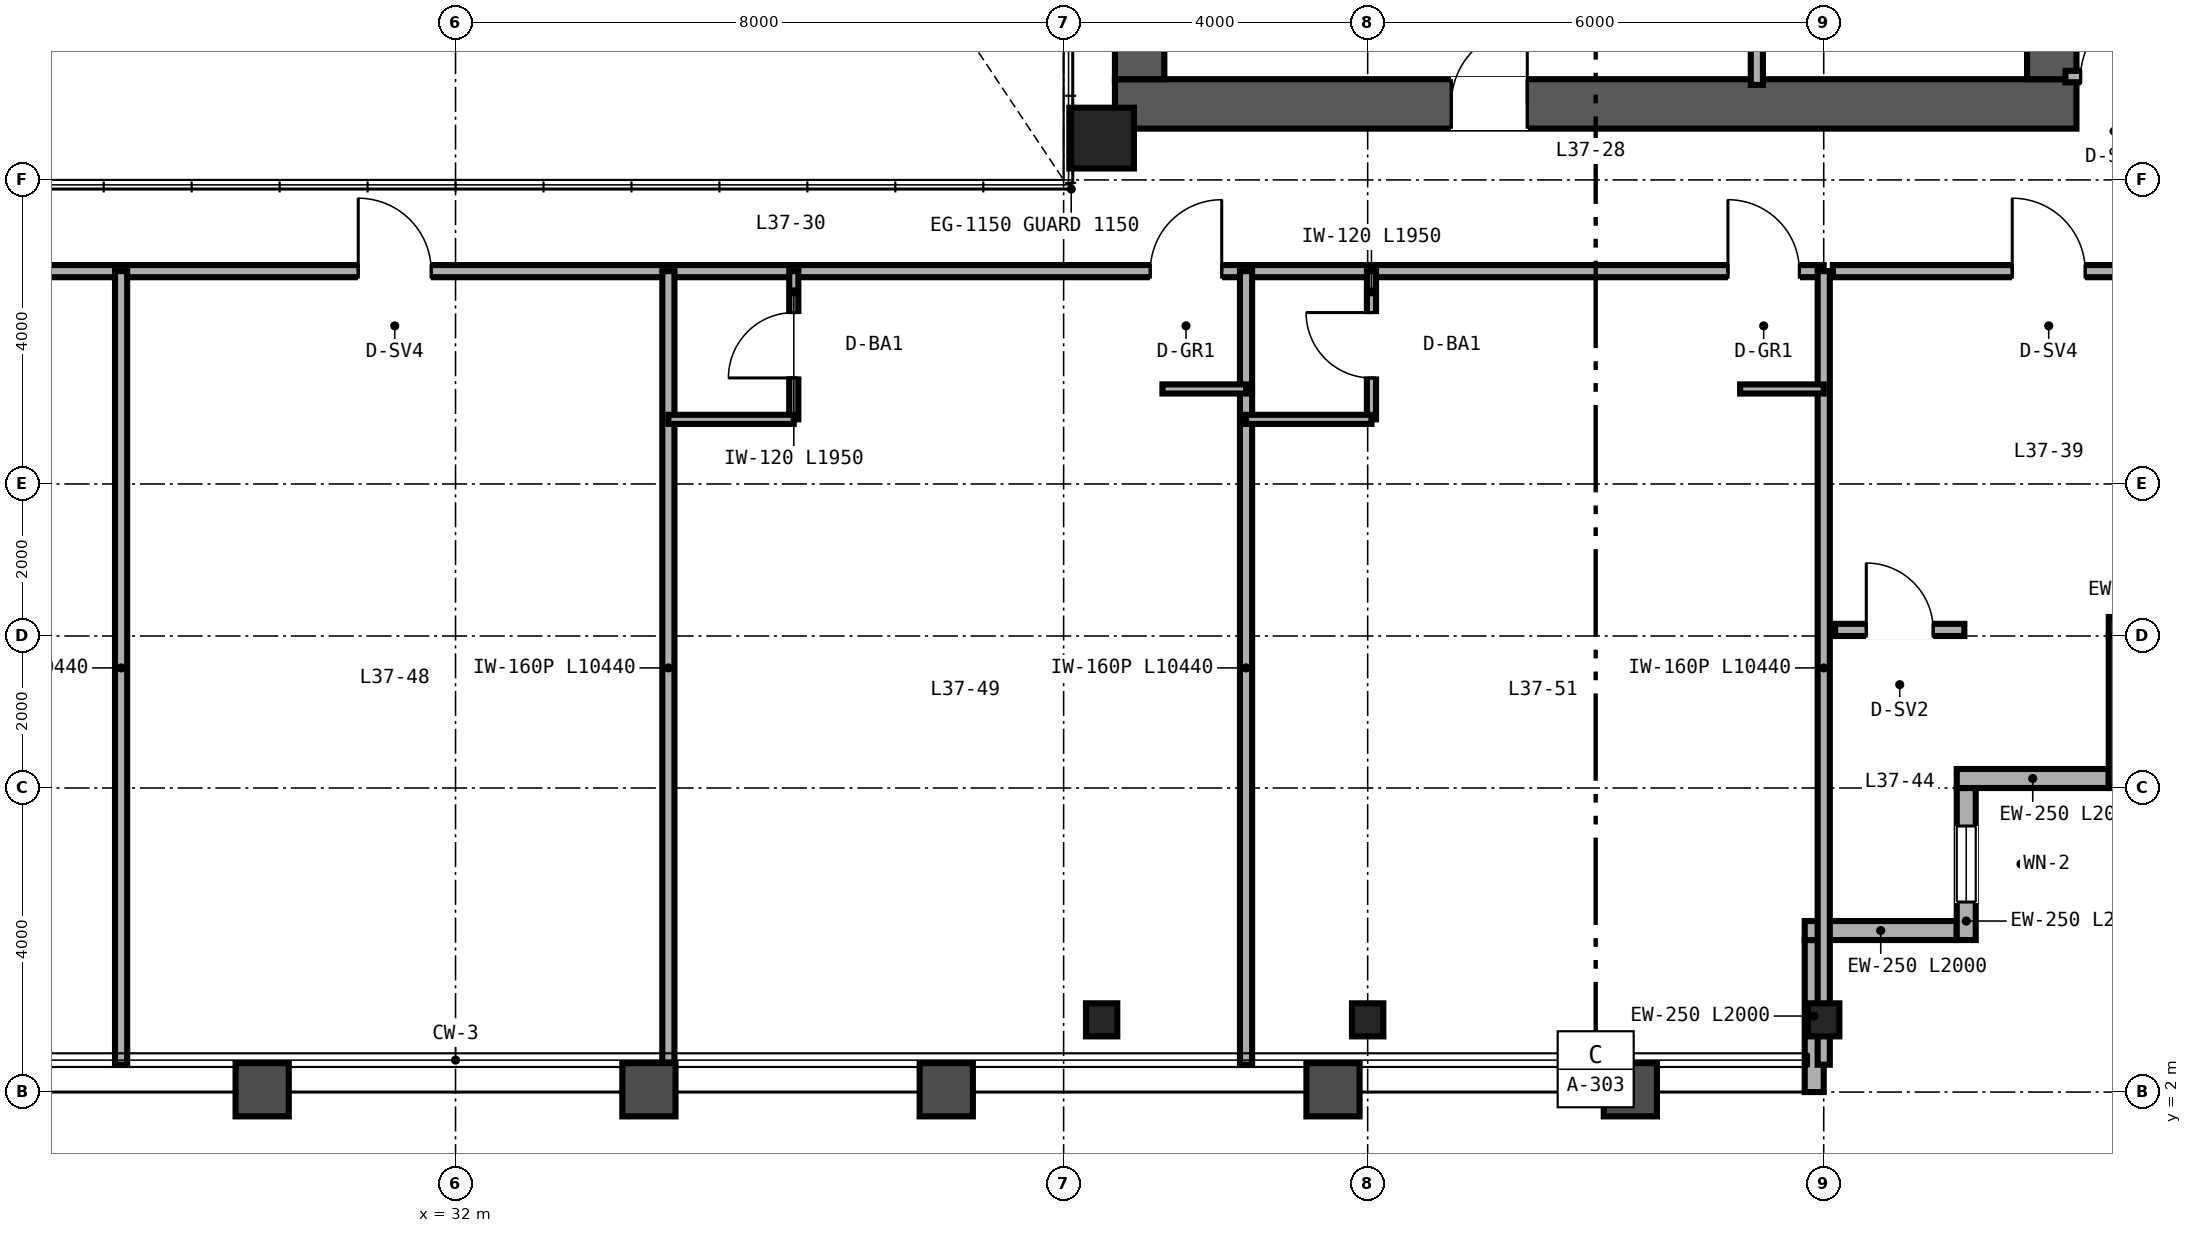
"""IFC4 building model, lengths in metres.
Left out: names, types, materials, properties, quantities, classifications, styles, units other than length and angle.
Written with IfcOpenShell. Run it as: python <this file> out.ifc"""

import sys

from ifc_helpers import new_model, si_unit, direction, frame, frame_2d, origin, origin_2d, place, context, subcontext, project, spatial, rectangle, hollow_rectangle, i_section, extrude, source, transform, mapped, element, fill, save


model = new_model("IFC4")
c1 = context("Model", 3, precision=1e-05, world=origin(), true_north=direction((0.0, 1.0)))
c2 = subcontext(c1, "Body", "Model", "MODEL_VIEW")
j1 = project(units=[si_unit("LENGTHUNIT", "METRE"), si_unit("PLANEANGLEUNIT", "RADIAN")], contexts=[c1])
p1 = place(None, origin())
s1 = spatial("IfcSite", under=j1, at=p1, CompositionType="ELEMENT")
p2 = place(p1, origin())
s2 = spatial("IfcBuilding", under=s1, at=p2, CompositionType="ELEMENT")
p3 = place(p2, frame((0.0, 0.0, 147.6)))
s3 = spatial("IfcBuildingStorey", under=s2, at=p3, CompositionType="ELEMENT", Elevation=147.6)
p4 = place(p3, frame((40.675, 15.0, 0.0), z_axis=(0.0, 0.0, 1.0), x_axis=(1.0, 0.0, 0.0)))
e1 = element("IfcWall", 1, at=p4, inside=s3, PredefinedType="SHEAR", context=c2, shape_type="SweptSolid", body=[
    extrude(rectangle(XDim=12.65, YDim=0.65, at=frame_2d((6.325, 0.0))), origin(), (0.0, 0.0, 1.0), 3.28),
])
p5 = place(p4, frame((4.425, 0.0, 0.0)))
e2 = element("IfcOpeningElement", 2, at=p5, cuts=e1, PredefinedType="OPENING", context=c2, shape_type="SweptSolid", body=[
    extrude(rectangle(XDim=1.0, YDim=2.15, at=frame_2d((0.5, 1.075))), frame((0.0, 0.335, 0.0), z_axis=(0.0, -1.0, 0.0), x_axis=(1.0, 0.0, 0.0)), (0.0, 0.0, 1.0), 0.67),
])
for number, where, z_axis, x_axis in (
    (3, (41.0, 15.325, 0.0), (0.0, 0.0, 1.0), (0.0, 1.0, 0.0)),
    (4, (53.0, 15.325, 0.0), (0.0, 0.0, 1.0), (0.0, 1.0, 0.0)),
):
    element("IfcWall", number, at=place(p3, frame(where, z_axis=z_axis, x_axis=x_axis)), inside=s3, PredefinedType="SHEAR", context=c2, shape_type="SweptSolid", body=[
        extrude(rectangle(XDim=21.35, YDim=0.65, at=frame_2d((10.675, 0.0))), origin(), (0.0, 0.0, 1.0), 3.28),
    ])
m1 = source(origin(), c2, "Body", "SweptSolid", [
    extrude(hollow_rectangle(XDim=0.85, YDim=0.8, WallThickness=0.032, at=origin_2d()), origin(), (0.0, 0.0, 1.0), 3.28),
])
p6 = place(p3, frame((40.5, 14.55, 0.0), z_axis=(0.0, 0.0, 1.0), x_axis=(1.0, 0.0, 0.0)))
e5 = element("IfcColumn", 5, at=p6, inside=s3, PredefinedType="COLUMN", context=c2, shape_type="MappedRepresentation", body=[
    mapped(m1, transform((0.0, 0.0, 0.0), scale=1.0)),
])
m2 = source(origin(), c2, "Body", "SweptSolid", [
    extrude(i_section(OverallWidth=0.412, OverallDepth=0.435, WebThickness=0.036, FlangeThickness=0.057, FilletRadius=0.025, at=origin_2d()), origin(), (0.0, 0.0, 1.0), 3.28),
])
for number, where, z_axis, x_axis in (
    (6, (40.5, 2.95, 0.0), (0.0, 0.0, 1.0), (1.0, 0.0, 0.0)),
    (7, (44.0, 2.95, 0.0), (0.0, 0.0, 1.0), (1.0, 0.0, 0.0)),
    (8, (50.0, 2.95, 0.0), (0.0, 0.0, 1.0), (1.0, 0.0, 0.0)),
):
    element("IfcColumn", number, at=place(p3, frame(where, z_axis=z_axis, x_axis=x_axis)), inside=s3, PredefinedType="COLUMN", context=c2, shape_type="MappedRepresentation", body=[
        mapped(m2, transform((0.0, 0.0, 0.0), scale=1.0)),
    ])
p7 = place(p3, frame((49.875, 2.0, 0.0), z_axis=(0.0, 0.0, 1.0), x_axis=(0.0, 1.0, 0.0)))
e9 = element("IfcWall", 9, at=p7, inside=s3, PredefinedType="SOLIDWALL", context=c2, shape_type="SweptSolid", body=[
    extrude(rectangle(XDim=2.0, YDim=0.25, at=frame_2d((1.0, 0.0))), origin(), (0.0, 0.0, 1.0), 2.587),
])
p8 = place(p3, frame((49.75, 4.125, 0.0), z_axis=(0.0, 0.0, 1.0), x_axis=(1.0, 0.0, 0.0)))
e10 = element("IfcWall", 10, at=p8, inside=s3, PredefinedType="SOLIDWALL", context=c2, shape_type="SweptSolid", body=[
    extrude(rectangle(XDim=2.0, YDim=0.25, at=frame_2d((1.0, 0.0))), origin(), (0.0, 0.0, 1.0), 3.28),
])
p9 = place(p3, frame((51.875, 4.0, 0.0), z_axis=(0.0, 0.0, 1.0), x_axis=(0.0, 1.0, 0.0)))
e11 = element("IfcWall", 11, at=p9, inside=s3, PredefinedType="SOLIDWALL", context=c2, shape_type="SweptSolid", body=[
    extrude(rectangle(XDim=2.0, YDim=0.25, at=frame_2d((1.0, 0.0))), origin(), (0.0, 0.0, 1.0), 3.28),
])
p10 = place(p9, frame((0.5, 0.0, 0.85)))
e12 = element("IfcOpeningElement", 12, at=p10, cuts=e11, PredefinedType="OPENING", context=c2, shape_type="SweptSolid", body=[
    extrude(rectangle(XDim=1.0, YDim=1.9, at=frame_2d((0.5, 0.95))), frame((0.0, 0.135, 0.0), z_axis=(0.0, -1.0, 0.0), x_axis=(1.0, 0.0, 0.0)), (0.0, 0.0, 1.0), 0.27),
])
for number, where, z_axis, x_axis in (
    (13, (51.75, 6.125, 0.0), (0.0, 0.0, 1.0), (1.0, 0.0, 0.0)),
    (14, (53.875, 6.0, 0.0), (0.0, 0.0, 1.0), (0.0, 1.0, 0.0)),
):
    element("IfcWall", number, at=place(p3, frame(where, z_axis=z_axis, x_axis=x_axis)), inside=s3, PredefinedType="SOLIDWALL", context=c2, shape_type="SweptSolid", body=[
        extrude(rectangle(XDim=2.0, YDim=0.25, at=frame_2d((1.0, 0.0))), origin(), (0.0, 0.0, 1.0), 3.28),
    ])
p11 = place(p3, frame((53.75, 8.125, 0.0), z_axis=(0.0, 0.0, 1.0), x_axis=(1.0, 0.0, 0.0)))
e15 = element("IfcWall", 15, at=p11, inside=s3, PredefinedType="SOLIDWALL", context=c2, shape_type="SweptSolid", body=[
    extrude(rectangle(XDim=2.25, YDim=0.25, at=frame_2d((1.125, 0.0))), origin(), (0.0, 0.0, 1.0), 3.28),
])
p12 = place(p3, frame((49.12, 15.25, 0.0), z_axis=(0.0, 0.0, 1.0), x_axis=(0.0, 1.0, 0.0)))
e16 = element("IfcWall", 16, at=p12, inside=s3, PredefinedType="PARTITIONING", context=c2, shape_type="SweptSolid", body=[
    extrude(rectangle(XDim=16.13, YDim=0.16, at=frame_2d((8.065, 0.0))), origin(), (0.0, 0.0, 1.0), 2.36),
])
p13 = place(p12, frame((3.8, 0.0, 0.0)))
e17 = element("IfcOpeningElement", 17, at=p13, cuts=e16, PredefinedType="OPENING", context=c2, shape_type="SweptSolid", body=[
    extrude(rectangle(XDim=0.92, YDim=2.15, at=frame_2d((0.46, 1.075))), frame((0.0, 0.09, 0.0), z_axis=(0.0, -1.0, 0.0), x_axis=(1.0, 0.0, 0.0)), (0.0, 0.0, 1.0), 0.18),
])
p14 = place(p12, frame((11.8, 0.0, 0.0)))
e18 = element("IfcOpeningElement", 18, at=p14, cuts=e16, PredefinedType="OPENING", context=c2, shape_type="SweptSolid", body=[
    extrude(rectangle(XDim=0.9, YDim=2.15, at=frame_2d((0.45, 1.075))), frame((0.0, 0.09, 0.0), z_axis=(0.0, -1.0, 0.0), x_axis=(1.0, 0.0, 0.0)), (0.0, 0.0, 1.0), 0.18),
])
p15 = place(p3, frame((53.18, 15.36, 0.0), z_axis=(0.0, 0.0, 1.0), x_axis=(1.0, 0.0, 0.0)))
e19 = element("IfcWall", 19, at=p15, inside=s3, PredefinedType="PARTITIONING", context=c2, shape_type="SweptSolid", body=[
    extrude(rectangle(XDim=2.66, YDim=0.15, at=frame_2d((1.33, 0.0))), origin(), (0.0, 0.0, 1.0), 2.501),
])
p16 = place(p15, frame((0.2, 0.0, 0.0)))
e20 = element("IfcOpeningElement", 20, at=p16, cuts=e19, PredefinedType="OPENING", context=c2, shape_type="SweptSolid", body=[
    extrude(rectangle(XDim=0.88, YDim=2.15, at=frame_2d((0.44, 1.075))), frame((0.0, 0.085, 0.0), z_axis=(0.0, -1.0, 0.0), x_axis=(1.0, 0.0, 0.0)), (0.0, 0.0, 1.0), 0.17),
])
p17 = place(p3, frame((50.12, 12.8, 0.0), z_axis=(0.0, 0.0, 1.0), x_axis=(1.0, 0.0, 0.0)))
e21 = element("IfcWall", 21, at=p17, inside=s3, PredefinedType="PARTITIONING", context=c2, shape_type="SweptSolid", body=[
    extrude(rectangle(XDim=5.68, YDim=0.16, at=frame_2d((2.84, 0.0))), origin(), (0.0, 0.0, 1.0), 3.28),
])
p18 = place(p17, frame((2.36, 0.0, 0.0)))
e22 = element("IfcOpeningElement", 22, at=p18, cuts=e21, PredefinedType="OPENING", context=c2, shape_type="SweptSolid", body=[
    extrude(rectangle(XDim=0.96, YDim=2.15, at=frame_2d((0.48, 1.075))), frame((0.0, 0.09, 0.0), z_axis=(0.0, -1.0, 0.0), x_axis=(1.0, 0.0, 0.0)), (0.0, 0.0, 1.0), 0.18),
])
p19 = place(p3, frame((50.15, 8.08, 0.0), z_axis=(0.0, 0.0, 1.0), x_axis=(1.0, 0.0, 0.0)))
e23 = element("IfcWall", 23, at=p19, inside=s3, PredefinedType="PARTITIONING", context=c2, shape_type="SweptSolid", body=[
    extrude(rectangle(XDim=1.7, YDim=0.16, at=frame_2d((0.85, 0.0))), origin(), (0.0, 0.0, 1.0), 3.28),
])
p20 = place(p19, frame((0.41, 0.0, 0.0)))
e24 = element("IfcOpeningElement", 24, at=p20, cuts=e23, PredefinedType="OPENING", context=c2, shape_type="SweptSolid", body=[
    extrude(rectangle(XDim=0.88, YDim=2.15, at=frame_2d((0.44, 1.075))), frame((0.0, 0.09, 0.0), z_axis=(0.0, -1.0, 0.0), x_axis=(1.0, 0.0, 0.0)), (0.0, 0.0, 1.0), 0.18),
])
p21 = place(p3, frame((14.0, 12.8, 0.0), z_axis=(0.0, 0.0, 1.0), x_axis=(1.0, 0.0, 0.0)))
e25 = element("IfcWall", 25, at=p21, inside=s3, PredefinedType="PARTITIONING", context=c2, shape_type="SweptSolid", body=[
    extrude(rectangle(XDim=36.0, YDim=0.16, at=frame_2d((18.0, 0.0))), origin(), (0.0, 0.0, 1.0), 2.501),
])
p22 = place(p21, frame((5.5, 0.0, 0.0)))
e26 = element("IfcOpeningElement", 26, at=p22, cuts=e25, PredefinedType="OPENING", context=c2, shape_type="SweptSolid", body=[
    extrude(rectangle(XDim=0.98, YDim=2.2, at=frame_2d((0.49, 1.1))), frame((0.0, 0.09, 0.0), z_axis=(0.0, -1.0, 0.0), x_axis=(1.0, 0.0, 0.0)), (0.0, 0.0, 1.0), 0.18),
])
p23 = place(p21, frame((10.2, 0.0, 0.0)))
e27 = element("IfcOpeningElement", 27, at=p23, cuts=e25, PredefinedType="OPENING", context=c2, shape_type="SweptSolid", body=[
    extrude(rectangle(XDim=0.96, YDim=2.15, at=frame_2d((0.48, 1.075))), frame((0.0, 0.09, 0.0), z_axis=(0.0, -1.0, 0.0), x_axis=(1.0, 0.0, 0.0)), (0.0, 0.0, 1.0), 0.18),
])
p24 = place(p21, frame((16.72, 0.0, 0.0)))
e28 = element("IfcOpeningElement", 28, at=p24, cuts=e25, PredefinedType="OPENING", context=c2, shape_type="SweptSolid", body=[
    extrude(rectangle(XDim=0.96, YDim=2.15, at=frame_2d((0.48, 1.075))), frame((0.0, 0.09, 0.0), z_axis=(0.0, -1.0, 0.0), x_axis=(1.0, 0.0, 0.0)), (0.0, 0.0, 1.0), 0.18),
])
p25 = place(p21, frame((27.14, 0.0, 0.0)))
e29 = element("IfcOpeningElement", 29, at=p25, cuts=e25, PredefinedType="OPENING", context=c2, shape_type="SweptSolid", body=[
    extrude(rectangle(XDim=0.94, YDim=2.15, at=frame_2d((0.47, 1.075))), frame((0.0, 0.09, 0.0), z_axis=(0.0, -1.0, 0.0), x_axis=(1.0, 0.0, 0.0)), (0.0, 0.0, 1.0), 0.18),
])
p26 = place(p21, frame((34.74, 0.0, 0.0)))
e30 = element("IfcOpeningElement", 30, at=p26, cuts=e25, PredefinedType="OPENING", context=c2, shape_type="SweptSolid", body=[
    extrude(rectangle(XDim=0.94, YDim=2.15, at=frame_2d((0.47, 1.075))), frame((0.0, 0.09, 0.0), z_axis=(0.0, -1.0, 0.0), x_axis=(1.0, 0.0, 0.0)), (0.0, 0.0, 1.0), 0.18),
])
p27 = place(p3, frame((50.0, 2.36, 0.0), z_axis=(0.0, 0.0, 1.0), x_axis=(0.0, 1.0, 0.0)))
e31 = element("IfcWall", 31, at=p27, inside=s3, PredefinedType="PARTITIONING", context=c2, shape_type="SweptSolid", body=[
    extrude(rectangle(XDim=10.44, YDim=0.16, at=frame_2d((5.22, 0.0))), origin(), (0.0, 0.0, 1.0), 2.587),
])
for number, where, z_axis, x_axis in (
    (32, (27.6, 2.36, 0.0), (0.0, 0.0, 1.0), (0.0, 1.0, 0.0)),
    (33, (34.8, 2.36, 0.0), (0.0, 0.0, 1.0), (0.0, 1.0, 0.0)),
):
    element("IfcWall", number, at=place(p3, frame(where, z_axis=z_axis, x_axis=x_axis)), inside=s3, PredefinedType="PARTITIONING", context=c2, shape_type="SweptSolid", body=[
        extrude(rectangle(XDim=10.44, YDim=0.16, at=frame_2d((5.22, 0.0))), origin(), (0.0, 0.0, 1.0), 2.36),
    ])
p28 = place(p3, frame((42.4, 2.36, 0.0), z_axis=(0.0, 0.0, 1.0), x_axis=(0.0, 1.0, 0.0)))
e34 = element("IfcWall", 34, at=p28, inside=s3, PredefinedType="PARTITIONING", context=c2, shape_type="SweptSolid", body=[
    extrude(rectangle(XDim=10.44, YDim=0.16, at=frame_2d((5.22, 0.0))), origin(), (0.0, 0.0, 1.0), 2.743),
])
p29 = place(p3, frame((36.45, 10.85, 0.0), z_axis=(0.0, 0.0, 1.0), x_axis=(0.0, 1.0, 0.0)))
e35 = element("IfcWall", 35, at=p29, inside=s3, PredefinedType="PARTITIONING", context=c2, shape_type="SweptSolid", body=[
    extrude(rectangle(XDim=1.95, YDim=0.12, at=frame_2d((0.975, 0.0))), origin(), (0.0, 0.0, 1.0), 3.28),
])
p30 = place(p29, frame((0.545, 0.0, 0.0)))
e36 = element("IfcOpeningElement", 36, at=p30, cuts=e35, PredefinedType="OPENING", context=c2, shape_type="SweptSolid", body=[
    extrude(rectangle(XDim=0.86, YDim=2.1, at=frame_2d((0.43, 1.05))), frame((0.0, 0.07, 0.0), z_axis=(0.0, -1.0, 0.0), x_axis=(1.0, 0.0, 0.0)), (0.0, 0.0, 1.0), 0.14),
])
p31 = place(p3, frame((34.8, 10.85, 0.0), z_axis=(0.0, 0.0, 1.0), x_axis=(1.0, 0.0, 0.0)))
e37 = element("IfcWall", 37, at=p31, inside=s3, PredefinedType="PARTITIONING", context=c2, shape_type="SweptSolid", body=[
    extrude(rectangle(XDim=1.65, YDim=0.12, at=frame_2d((0.825, 0.0))), origin(), (0.0, 0.0, 1.0), 3.28),
])
p32 = place(p3, frame((41.3, 11.25, 0.0), z_axis=(0.0, 0.0, 1.0), x_axis=(1.0, 0.0, 0.0)))
e38 = element("IfcWall", 38, at=p32, inside=s3, PredefinedType="PARTITIONING", context=c2, shape_type="SweptSolid", body=[
    extrude(rectangle(XDim=1.1, YDim=0.12, at=frame_2d((0.55, 0.0))), origin(), (0.0, 0.0, 1.0), 3.28),
])
p33 = place(p3, frame((44.05, 10.85, 0.0), z_axis=(0.0, 0.0, 1.0), x_axis=(0.0, 1.0, 0.0)))
e39 = element("IfcWall", 39, at=p33, inside=s3, PredefinedType="PARTITIONING", context=c2, shape_type="SweptSolid", body=[
    extrude(rectangle(XDim=1.95, YDim=0.12, at=frame_2d((0.975, 0.0))), origin(), (0.0, 0.0, 1.0), 3.28),
])
p34 = place(p33, frame((0.545, 0.0, 0.0)))
e40 = element("IfcOpeningElement", 40, at=p34, cuts=e39, PredefinedType="OPENING", context=c2, shape_type="SweptSolid", body=[
    extrude(rectangle(XDim=0.86, YDim=2.1, at=frame_2d((0.43, 1.05))), frame((0.0, 0.07, 0.0), z_axis=(0.0, -1.0, 0.0), x_axis=(1.0, 0.0, 0.0)), (0.0, 0.0, 1.0), 0.14),
])
p35 = place(p3, frame((42.4, 10.85, 0.0), z_axis=(0.0, 0.0, 1.0), x_axis=(1.0, 0.0, 0.0)))
e41 = element("IfcWall", 41, at=p35, inside=s3, PredefinedType="PARTITIONING", context=c2, shape_type="SweptSolid", body=[
    extrude(rectangle(XDim=1.65, YDim=0.12, at=frame_2d((0.825, 0.0))), origin(), (0.0, 0.0, 1.0), 3.28),
])
p36 = place(p3, frame((48.9, 11.25, 0.0), z_axis=(0.0, 0.0, 1.0), x_axis=(1.0, 0.0, 0.0)))
e42 = element("IfcWall", 42, at=p36, inside=s3, PredefinedType="PARTITIONING", context=c2, shape_type="SweptSolid", body=[
    extrude(rectangle(XDim=1.1, YDim=0.12, at=frame_2d((0.55, 0.0))), origin(), (0.0, 0.0, 1.0), 3.28),
])
m3 = source(origin(), c2, "Body", "SweptSolid", [
    extrude(rectangle(XDim=1.0, YDim=1.9, at=frame_2d((0.5, 0.95))), frame((0.0, 0.03, 0.0), z_axis=(0.0, -1.0, 0.0), x_axis=(1.0, 0.0, 0.0)), (0.0, 0.0, 1.0), 0.06),
])
p37 = place(p10, origin())
e43 = element("IfcWindow", 43, at=p37, inside=s3, PartitioningType="SINGLE_PANEL", PredefinedType="WINDOW", context=c2, shape_type="MappedRepresentation", body=[
    mapped(m3, transform((0.0, 0.0, 0.0), scale=1.0)),
])
fill(e12, e43)
m4 = source(origin(), c2, "Body", "SweptSolid", [
    extrude(rectangle(XDim=1.0, YDim=2.15, at=frame_2d((0.5, 1.075))), frame((0.0, 0.025, 0.0), z_axis=(0.0, -1.0, 0.0), x_axis=(1.0, 0.0, 0.0)), (0.0, 0.0, 1.0), 0.05),
])
p38 = place(p5, origin())
e44 = element("IfcDoor", 44, at=p38, inside=s3, OperationType="SINGLE_SWING_RIGHT", PredefinedType="DOOR", context=c2, shape_type="MappedRepresentation", body=[
    mapped(m4, transform((0.0, 0.0, 0.0), scale=1.0)),
])
fill(e2, e44)
m5 = source(origin(), c2, "Body", "SweptSolid", [
    extrude(rectangle(XDim=0.88, YDim=2.15, at=frame_2d((0.44, 1.075))), frame((0.0, 0.025, 0.0), z_axis=(0.0, -1.0, 0.0), x_axis=(1.0, 0.0, 0.0)), (0.0, 0.0, 1.0), 0.05),
])
p39 = place(p16, origin())
e45 = element("IfcDoor", 45, at=p39, inside=s3, OperationType="SINGLE_SWING_RIGHT", PredefinedType="DOOR", context=c2, shape_type="MappedRepresentation", body=[
    mapped(m5, transform((0.0, 0.0, 0.0), scale=1.0)),
])
fill(e20, e45)
m6 = source(origin(), c2, "Body", "SweptSolid", [
    extrude(rectangle(XDim=0.96, YDim=2.15, at=frame_2d((0.48, 1.075))), frame((0.0, 0.025, 0.0), z_axis=(0.0, -1.0, 0.0), x_axis=(1.0, 0.0, 0.0)), (0.0, 0.0, 1.0), 0.05),
])
p40 = place(p18, origin())
e46 = element("IfcDoor", 46, at=p40, inside=s3, OperationType="SINGLE_SWING_LEFT", PredefinedType="DOOR", context=c2, shape_type="MappedRepresentation", body=[
    mapped(m6, transform((0.0, 0.0, 0.0), scale=1.0)),
])
fill(e22, e46)
p41 = place(p20, origin())
e47 = element("IfcDoor", 47, at=p41, inside=s3, OperationType="SINGLE_SWING_LEFT", PredefinedType="DOOR", context=c2, shape_type="MappedRepresentation", body=[
    mapped(m5, transform((0.0, 0.0, 0.0), scale=1.0)),
])
fill(e24, e47)
m7 = source(origin(), c2, "Body", "SweptSolid", [
    extrude(rectangle(XDim=0.86, YDim=2.1, at=frame_2d((0.43, 1.05))), frame((0.0, 0.025, 0.0), z_axis=(0.0, -1.0, 0.0), x_axis=(1.0, 0.0, 0.0)), (0.0, 0.0, 1.0), 0.05),
])
p42 = place(p30, origin())
e48 = element("IfcDoor", 48, at=p42, inside=s3, OperationType="SINGLE_SWING_LEFT", PredefinedType="DOOR", context=c2, shape_type="MappedRepresentation", body=[
    mapped(m7, transform((0.0, 0.0, 0.0), scale=1.0)),
])
fill(e36, e48)
p43 = place(p34, origin())
e49 = element("IfcDoor", 49, at=p43, inside=s3, OperationType="SINGLE_SWING_RIGHT", PredefinedType="DOOR", context=c2, shape_type="MappedRepresentation", body=[
    mapped(m7, transform((0.0, 0.0, 0.0), scale=1.0)),
])
fill(e40, e49)
p44 = place(p24, origin())
e50 = element("IfcDoor", 50, at=p44, inside=s3, OperationType="SINGLE_SWING_LEFT", PredefinedType="DOOR", context=c2, shape_type="MappedRepresentation", body=[
    mapped(m6, transform((0.0, 0.0, 0.0), scale=1.0)),
])
fill(e28, e50)
m8 = source(origin(), c2, "Body", "SweptSolid", [
    extrude(rectangle(XDim=0.94, YDim=2.15, at=frame_2d((0.47, 1.075))), frame((0.0, 0.025, 0.0), z_axis=(0.0, -1.0, 0.0), x_axis=(1.0, 0.0, 0.0)), (0.0, 0.0, 1.0), 0.05),
])
p45 = place(p25, origin())
e51 = element("IfcDoor", 51, at=p45, inside=s3, OperationType="SINGLE_SWING_RIGHT", PredefinedType="DOOR", context=c2, shape_type="MappedRepresentation", body=[
    mapped(m8, transform((0.0, 0.0, 0.0), scale=1.0)),
])
fill(e29, e51)
p46 = place(p26, origin())
e52 = element("IfcDoor", 52, at=p46, inside=s3, OperationType="SINGLE_SWING_LEFT", PredefinedType="DOOR", context=c2, shape_type="MappedRepresentation", body=[
    mapped(m8, transform((0.0, 0.0, 0.0), scale=1.0)),
])
fill(e30, e52)
save(model, sys.argv[1])
